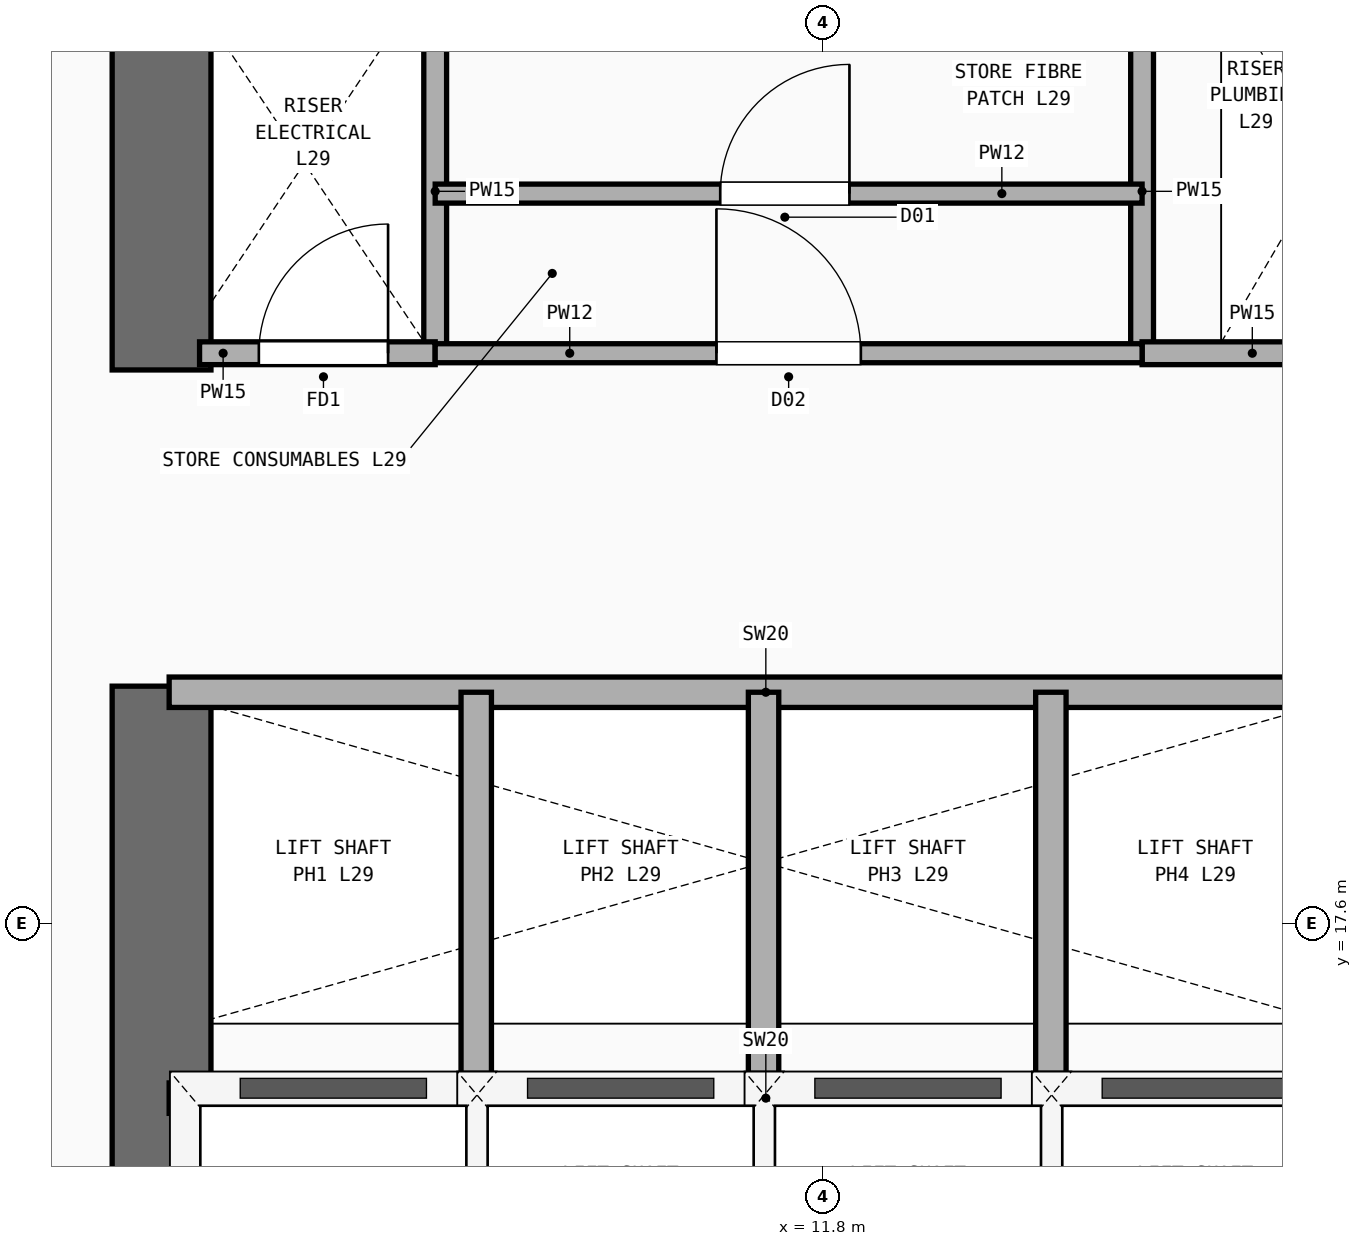
"""IFC4 building model, lengths in metres.
Left out: names, types, materials, properties, quantities, classifications, styles, units other than length and angle.
Written with IfcOpenShell. Run it as: python <this file> out.ifc"""

import sys

from ifc_helpers import new_model, si_unit, direction, frame, frame_2d, origin, place, context, subcontext, project, spatial, rectangle, extrude, element, fill, save


model = new_model("IFC4")
c1 = context("Model", 3, precision=1e-05, world=origin(), true_north=direction((0.0, 1.0)))
c2 = subcontext(c1, "Body", "Model", "MODEL_VIEW")
j1 = project(units=[si_unit("LENGTHUNIT", "METRE"), si_unit("PLANEANGLEUNIT", "RADIAN")], contexts=[c1])
p1 = place(None, origin())
s1 = spatial("IfcSite", under=j1, at=p1, CompositionType="ELEMENT")
p2 = place(p1, origin())
s2 = spatial("IfcBuilding", under=s1, at=p2, CompositionType="ELEMENT")
p3 = place(p2, frame((0.0, 0.0, 114.5)))
s3 = spatial("IfcBuildingStorey", under=s2, at=p3, CompositionType="ELEMENT", Elevation=114.5)
p4 = place(p3, frame((7.45, 14.35, 0.0), z_axis=(0.0, 0.0, 1.0), x_axis=(0.0, 1.0, 0.0)))
e1 = element("IfcWall", 1, at=p4, inside=s3, PredefinedType="SHEAR", context=c2, shape_type="SweptSolid", body=[
    extrude(rectangle(XDim=4.81, YDim=0.65, at=frame_2d((2.405, 0.0))), origin(), (0.0, 0.0, 1.0), 3.54),
])
p5 = place(p3, frame((7.45, 21.24, 0.0), z_axis=(0.0, 0.0, 1.0), x_axis=(0.0, 1.0, 0.0)))
e2 = element("IfcWall", 2, at=p5, inside=s3, PredefinedType="SHEAR", context=c2, shape_type="SweptSolid", body=[
    extrude(rectangle(XDim=2.26, YDim=0.65, at=frame_2d((1.13, 0.0))), origin(), (0.0, 0.0, 1.0), 3.54),
])
p6 = place(p3, frame((7.5, 16.45, 0.0), z_axis=(0.0, 0.0, 1.0), x_axis=(1.0, 0.0, 0.0)))
e3 = element("IfcWall", 3, at=p6, inside=s3, PredefinedType="PARTITIONING", context=c2, shape_type="SweptSolid", body=[
    extrude(rectangle(XDim=7.85, YDim=0.2, at=frame_2d((3.925, 0.0))), origin(), (0.0, 0.0, 1.0), 3.54),
])
for number, where, z_axis, x_axis in (
    (4, (9.52, 14.22, 0.0), (0.0, 0.0, 1.0), (0.0, 1.0, 0.0)),
    (5, (11.41, 14.22, 0.0), (0.0, 0.0, 1.0), (0.0, 1.0, 0.0)),
    (6, (13.3, 14.22, 0.0), (0.0, 0.0, 1.0), (0.0, 1.0, 0.0)),
):
    element("IfcWall", number, at=place(p3, frame(where, z_axis=z_axis, x_axis=x_axis)), inside=s3, PredefinedType="PARTITIONING", context=c2, shape_type="SweptSolid", body=[
        extrude(rectangle(XDim=2.23, YDim=0.2, at=frame_2d((1.115, 0.0))), origin(), (0.0, 0.0, 1.0), 3.54),
    ])
p7 = place(p3, frame((7.5, 19.12, 0.0), z_axis=(0.0, 0.0, 1.0), x_axis=(1.0, 0.0, 0.0)))
e7 = element("IfcWall", 7, at=p7, inside=s3, PredefinedType="PARTITIONING", context=c2, shape_type="SweptSolid", body=[
    extrude(rectangle(XDim=7.85, YDim=0.2, at=frame_2d((3.925, 0.0))), origin(), (0.0, 0.0, 1.0), 3.54),
])
for number, where, z_axis, x_axis in (
    (8, (9.52, 16.45, 0.0), (0.0, 0.0, 1.0), (0.0, 1.0, 0.0)),
    (9, (11.41, 16.45, 0.0), (0.0, 0.0, 1.0), (0.0, 1.0, 0.0)),
    (10, (13.3, 16.45, 0.0), (0.0, 0.0, 1.0), (0.0, 1.0, 0.0)),
):
    element("IfcWall", number, at=place(p3, frame(where, z_axis=z_axis, x_axis=x_axis)), inside=s3, PredefinedType="PARTITIONING", context=c2, shape_type="SweptSolid", body=[
        extrude(rectangle(XDim=2.67, YDim=0.2, at=frame_2d((1.335, 0.0))), origin(), (0.0, 0.0, 1.0), 3.54),
    ])
for number, where, z_axis, x_axis in (
    (11, (9.25, 21.35, 0.0), (0.0, 0.0, 1.0), (0.0, 1.0, 0.0)),
    (12, (13.9, 21.35, 0.0), (0.0, 0.0, 1.0), (0.0, 1.0, 0.0)),
):
    element("IfcWall", number, at=place(p3, frame(where, z_axis=z_axis, x_axis=x_axis)), inside=s3, PredefinedType="PARTITIONING", context=c2, shape_type="SweptSolid", body=[
        extrude(rectangle(XDim=2.13, YDim=0.15, at=frame_2d((1.065, 0.0))), origin(), (0.0, 0.0, 1.0), 3.54),
    ])
p8 = place(p3, frame((7.7, 21.35, 0.0), z_axis=(0.0, 0.0, 1.0), x_axis=(1.0, 0.0, 0.0)))
e13 = element("IfcWall", 13, at=p8, inside=s3, PredefinedType="PARTITIONING", context=c2, shape_type="SweptSolid", body=[
    extrude(rectangle(XDim=1.55, YDim=0.15, at=frame_2d((0.775, 0.0))), origin(), (0.0, 0.0, 1.0), 3.54),
])
p9 = place(p8, frame((0.39, 0.0, 0.0)))
e14 = element("IfcOpeningElement", 14, at=p9, cuts=e13, PredefinedType="OPENING", context=c2, shape_type="SweptSolid", body=[
    extrude(rectangle(XDim=0.85, YDim=2.15, at=frame_2d((0.425, 1.075))), frame((0.0, 0.085, 0.0), z_axis=(0.0, -1.0, 0.0), x_axis=(1.0, 0.0, 0.0)), (0.0, 0.0, 1.0), 0.17),
])
p10 = place(p3, frame((13.9, 21.35, 0.0), z_axis=(0.0, 0.0, 1.0), x_axis=(1.0, 0.0, 0.0)))
e15 = element("IfcWall", 15, at=p10, inside=s3, PredefinedType="PARTITIONING", context=c2, shape_type="SweptSolid", body=[
    extrude(rectangle(XDim=1.45, YDim=0.15, at=frame_2d((0.725, 0.0))), origin(), (0.0, 0.0, 1.0), 3.54),
])
p11 = place(p3, frame((9.25, 21.35, 0.0), z_axis=(0.0, 0.0, 1.0), x_axis=(1.0, 0.0, 0.0)))
e16 = element("IfcWall", 16, at=p11, inside=s3, PredefinedType="PARTITIONING", context=c2, shape_type="SweptSolid", body=[
    extrude(rectangle(XDim=4.65, YDim=0.125, at=frame_2d((2.325, 0.0))), origin(), (0.0, 0.0, 1.0), 3.54),
])
p12 = place(p11, frame((1.85, 0.0, 0.0)))
e17 = element("IfcOpeningElement", 17, at=p12, cuts=e16, PredefinedType="OPENING", context=c2, shape_type="SweptSolid", body=[
    extrude(rectangle(XDim=0.95, YDim=2.15, at=frame_2d((0.475, 1.075))), frame((0.0, 0.073, 0.0), z_axis=(0.0, -1.0, 0.0), x_axis=(1.0, 0.0, 0.0)), (0.0, 0.0, 1.0), 0.145),
])
p13 = place(p3, frame((9.25, 22.4, 0.0), z_axis=(0.0, 0.0, 1.0), x_axis=(1.0, 0.0, 0.0)))
e18 = element("IfcWall", 18, at=p13, inside=s3, PredefinedType="PARTITIONING", context=c2, shape_type="SweptSolid", body=[
    extrude(rectangle(XDim=4.65, YDim=0.125, at=frame_2d((2.325, 0.0))), origin(), (0.0, 0.0, 1.0), 3.54),
])
p14 = place(p13, frame((1.875, 0.0, 0.0)))
e19 = element("IfcOpeningElement", 19, at=p14, cuts=e18, PredefinedType="OPENING", context=c2, shape_type="SweptSolid", body=[
    extrude(rectangle(XDim=0.85, YDim=2.15, at=frame_2d((0.425, 1.075))), frame((0.0, 0.073, 0.0), z_axis=(0.0, -1.0, 0.0), x_axis=(1.0, 0.0, 0.0)), (0.0, 0.0, 1.0), 0.145),
])
p15 = place(p9, origin())
e20 = element("IfcDoor", 20, at=p15, inside=s3, OperationType="SINGLE_SWING_RIGHT", PredefinedType="DOOR", context=c2, shape_type="SweptSolid", body=[
    extrude(rectangle(XDim=0.85, YDim=2.15, at=frame_2d((0.425, 1.075))), frame((0.0, 0.025, 0.0), z_axis=(0.0, -1.0, 0.0), x_axis=(1.0, 0.0, 0.0)), (0.0, 0.0, 1.0), 0.05),
])
fill(e14, e20)
p16 = place(p12, origin())
e21 = element("IfcDoor", 21, at=p16, inside=s3, OperationType="SINGLE_SWING_LEFT", PredefinedType="DOOR", context=c2, shape_type="SweptSolid", body=[
    extrude(rectangle(XDim=0.95, YDim=2.15, at=frame_2d((0.475, 1.075))), frame((0.0, 0.025, 0.0), z_axis=(0.0, -1.0, 0.0), x_axis=(1.0, 0.0, 0.0)), (0.0, 0.0, 1.0), 0.05),
])
fill(e17, e21)
p17 = place(p14, origin())
e22 = element("IfcDoor", 22, at=p17, inside=s3, OperationType="SINGLE_SWING_RIGHT", PredefinedType="DOOR", context=c2, shape_type="SweptSolid", body=[
    extrude(rectangle(XDim=0.85, YDim=2.15, at=frame_2d((0.425, 1.075))), frame((0.0, 0.025, 0.0), z_axis=(0.0, -1.0, 0.0), x_axis=(1.0, 0.0, 0.0)), (0.0, 0.0, 1.0), 0.05),
])
fill(e19, e22)
save(model, sys.argv[1])
